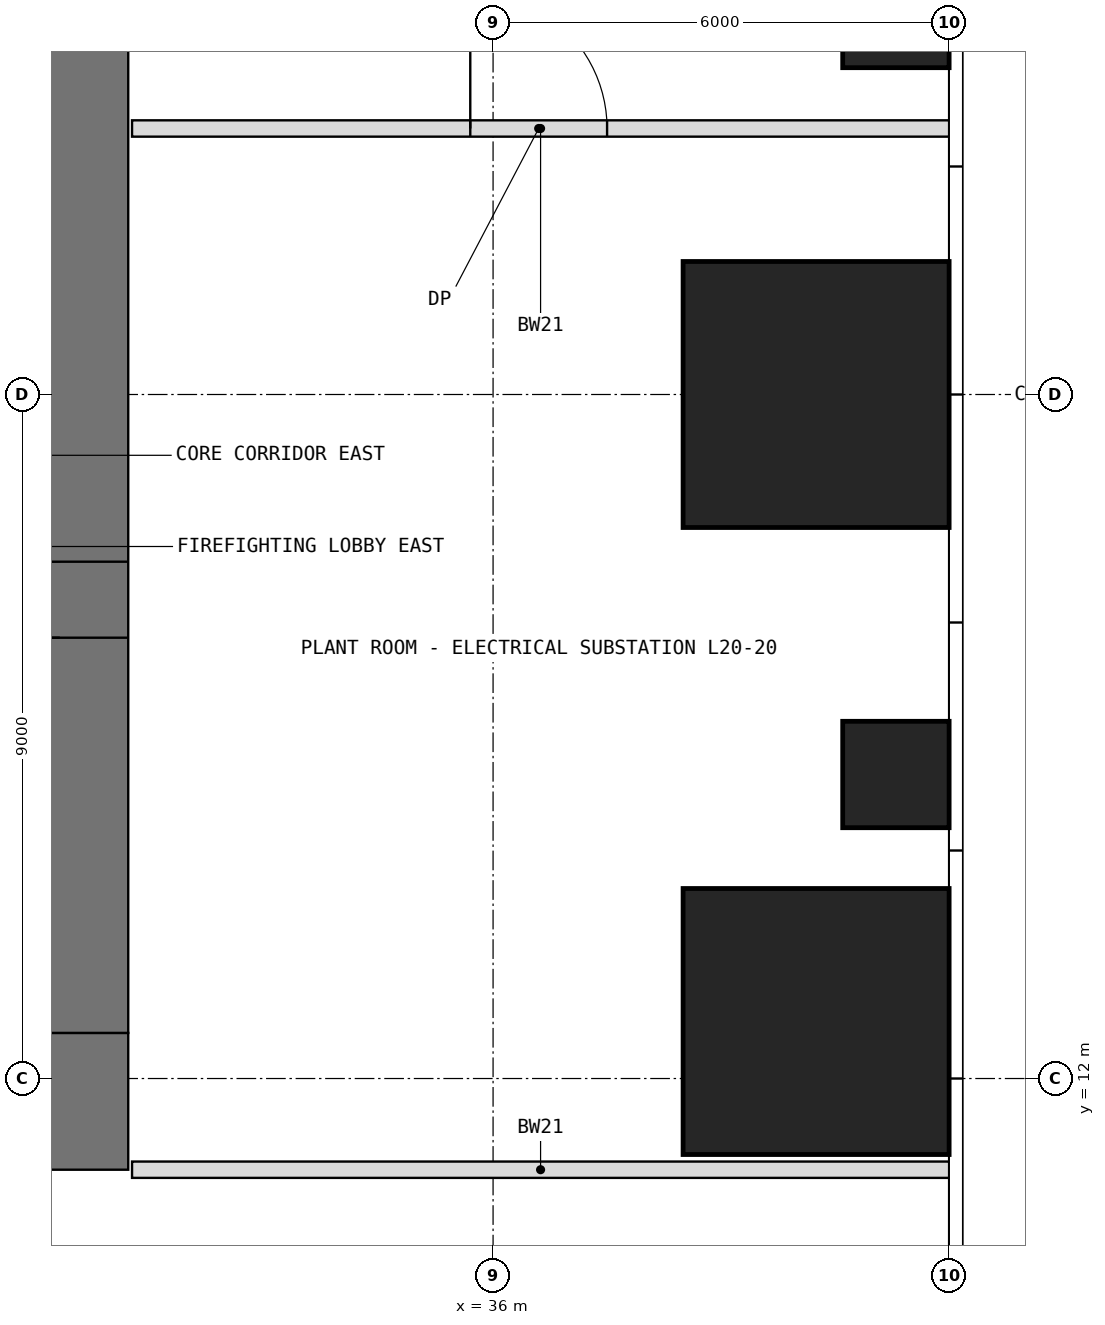
"""IFC4 building model, lengths in metres.
Left out: names, types, materials, properties, quantities, classifications, styles, units other than length and angle.
Written with IfcOpenShell. Run it as: python <this file> out.ifc"""

import sys

from ifc_helpers import new_model, si_unit, direction, frame, frame_2d, origin, origin_2d, place, context, subcontext, project, spatial, rectangle, extrude, element, fill, save


model = new_model("IFC4")
c1 = context("Model", 3, precision=1e-05, world=origin(), true_north=direction((0.0, 1.0)))
c2 = subcontext(c1, "Body", "Model", "MODEL_VIEW")
j1 = project(units=[si_unit("LENGTHUNIT", "METRE"), si_unit("PLANEANGLEUNIT", "RADIAN")], contexts=[c1])
p1 = place(None, origin())
s1 = spatial("IfcSite", under=j1, at=p1, CompositionType="ELEMENT")
p2 = place(p1, origin())
s2 = spatial("IfcBuilding", under=s1, at=p2, CompositionType="ELEMENT")
p3 = place(p2, frame((0.0, 0.0, 86.5)))
s3 = spatial("IfcBuildingStorey", under=s2, at=p3, CompositionType="ELEMENT", Elevation=86.5)
p4 = place(p3, frame((40.25, 12.75, 0.0), z_axis=(0.0, 0.0, 1.0), x_axis=(1.0, 0.0, 0.0)))
e1 = element("IfcColumn", 1, at=p4, inside=s3, PredefinedType="COLUMN", context=c2, shape_type="SweptSolid", body=[
    extrude(rectangle(XDim=3.5, YDim=3.5, at=origin_2d()), origin(), (0.0, 0.0, 1.0), 5.0),
])
p5 = place(p3, frame((41.3, 16.0, 0.0), z_axis=(0.0, 0.0, 1.0), x_axis=(1.0, 0.0, 0.0)))
e2 = element("IfcColumn", 2, at=p5, inside=s3, PredefinedType="COLUMN", context=c2, shape_type="SweptSolid", body=[
    extrude(rectangle(XDim=1.4, YDim=1.4, at=origin_2d()), origin(), (0.0, 0.0, 1.0), 5.0),
])
p6 = place(p3, frame((40.25, 21.0, 0.0), z_axis=(0.0, 0.0, 1.0), x_axis=(1.0, 0.0, 0.0)))
e3 = element("IfcColumn", 3, at=p6, inside=s3, PredefinedType="COLUMN", context=c2, shape_type="SweptSolid", body=[
    extrude(rectangle(XDim=3.5, YDim=3.5, at=origin_2d()), origin(), (0.0, 0.0, 1.0), 5.0),
])
p7 = place(p3, frame((41.3, 26.0, 0.0), z_axis=(0.0, 0.0, 1.0), x_axis=(1.0, 0.0, 0.0)))
e4 = element("IfcColumn", 4, at=p7, inside=s3, PredefinedType="COLUMN", context=c2, shape_type="SweptSolid", body=[
    extrude(rectangle(XDim=1.4, YDim=1.4, at=origin_2d()), origin(), (0.0, 0.0, 1.0), 5.0),
])
p8 = place(p3, frame((10.8, 11.7, -0.25), z_axis=(0.0, 0.0, 1.0), x_axis=(1.0, 0.0, 0.0)))
e5 = element("IfcWall", 5, at=p8, inside=s3, PredefinedType="SHEAR", context=c2, shape_type="SweptSolid", body=[
    extrude(rectangle(XDim=20.4, YDim=1.8, at=frame_2d((10.2, 0.0))), origin(), (0.0, 0.0, 1.0), 5.2),
])
p9 = place(p8, frame((13.125, 0.0, 0.25)))
e6 = element("IfcOpeningElement", 6, at=p9, cuts=e5, PredefinedType="OPENING", context=c2, shape_type="SweptSolid", body=[
    extrude(rectangle(XDim=0.95, YDim=2.4, at=frame_2d((0.475, 1.2))), frame((0.0, 0.91, 0.0), z_axis=(0.0, -1.0, 0.0), x_axis=(1.0, 0.0, 0.0)), (0.0, 0.0, 1.0), 1.82),
])
p10 = place(p3, frame((30.3, 12.6, -0.25), z_axis=(0.0, 0.0, 1.0), x_axis=(0.0, 1.0, 0.0)))
e7 = element("IfcWall", 7, at=p10, inside=s3, PredefinedType="SHEAR", context=c2, shape_type="SweptSolid", body=[
    extrude(rectangle(XDim=16.8, YDim=1.8, at=frame_2d((8.4, 0.0))), origin(), (0.0, 0.0, 1.0), 5.2),
])
p11 = place(p10, frame((5.2, 0.0, 0.25)))
e8 = element("IfcOpeningElement", 8, at=p11, cuts=e7, PredefinedType="OPENING", context=c2, shape_type="SweptSolid", body=[
    extrude(rectangle(XDim=1.0, YDim=2.2, at=frame_2d((0.5, 1.1))), frame((0.0, 0.91, 0.0), z_axis=(0.0, -1.0, 0.0), x_axis=(1.0, 0.0, 0.0)), (0.0, 0.0, 1.0), 1.82),
])
p12 = place(p3, frame((31.25, 10.8, 0.0), z_axis=(0.0, 0.0, 1.0), x_axis=(1.0, 0.0, 0.0)))
e9 = element("IfcWall", 9, at=p12, inside=s3, PredefinedType="PARTITIONING", context=c2, shape_type="SweptSolid", body=[
    extrude(rectangle(XDim=10.75, YDim=0.215, at=frame_2d((5.375, 0.0))), origin(), (0.0, 0.0, 1.0), 4.75),
])
p13 = place(p3, frame((31.25, 24.5, 0.0), z_axis=(0.0, 0.0, 1.0), x_axis=(1.0, 0.0, 0.0)))
e10 = element("IfcWall", 10, at=p13, inside=s3, PredefinedType="PARTITIONING", context=c2, shape_type="SweptSolid", body=[
    extrude(rectangle(XDim=10.75, YDim=0.215, at=frame_2d((5.375, 0.0))), origin(), (0.0, 0.0, 1.0), 4.75),
])
p14 = place(p13, frame((4.45, 0.0, 0.0)))
e11 = element("IfcOpeningElement", 11, at=p14, cuts=e10, PredefinedType="OPENING", context=c2, shape_type="SweptSolid", body=[
    extrude(rectangle(XDim=1.8, YDim=2.4, at=frame_2d((0.9, 1.2))), frame((0.0, 0.118, 0.0), z_axis=(0.0, -1.0, 0.0), x_axis=(1.0, 0.0, 0.0)), (0.0, 0.0, 1.0), 0.235),
])
p15 = place(p11, origin())
e12 = element("IfcDoor", 12, at=p15, inside=s3, OperationType="SINGLE_SWING_LEFT", PredefinedType="DOOR", context=c2, shape_type="SweptSolid", body=[
    extrude(rectangle(XDim=1.0, YDim=2.2, at=frame_2d((0.5, 1.1))), frame((0.0, 0.025, 0.0), z_axis=(0.0, -1.0, 0.0), x_axis=(1.0, 0.0, 0.0)), (0.0, 0.0, 1.0), 0.05),
])
fill(e8, e12)
p16 = place(p14, origin())
e13 = element("IfcDoor", 13, at=p16, inside=s3, OperationType="DOUBLE_DOOR_SINGLE_SWING", PredefinedType="DOOR", context=c2, shape_type="SweptSolid", body=[
    extrude(rectangle(XDim=1.8, YDim=2.4, at=frame_2d((0.9, 1.2))), frame((0.0, 0.025, 0.0), z_axis=(0.0, -1.0, 0.0), x_axis=(1.0, 0.0, 0.0)), (0.0, 0.0, 1.0), 0.05),
])
fill(e11, e13)
save(model, sys.argv[1])
